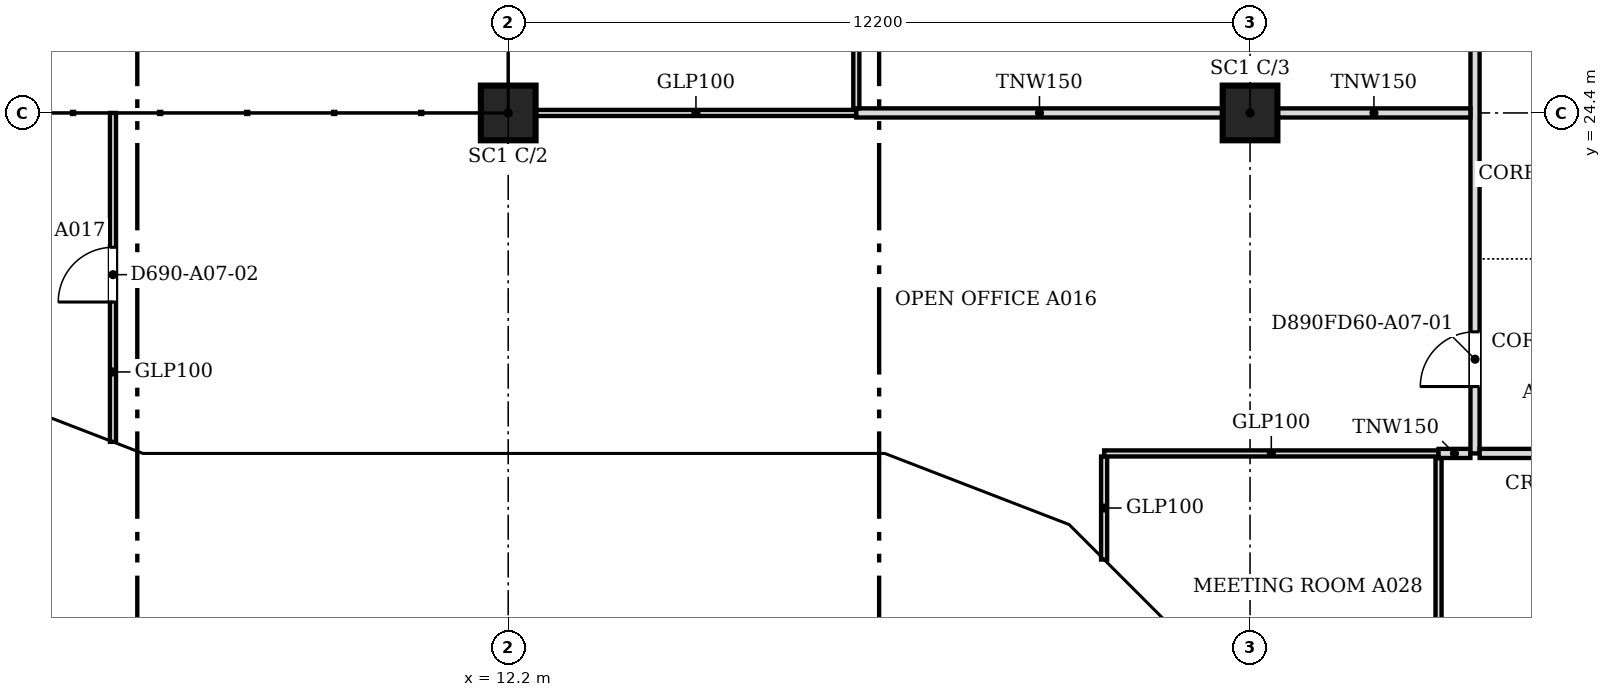
"""IFC4 building model, lengths in metres.
Left out: names, types, materials, properties, quantities, classifications, styles, units other than length and angle.
Written with IfcOpenShell. Run it as: python <this file> out.ifc"""

import sys

from ifc_helpers import new_model, si_unit, direction, frame, frame_2d, origin, origin_2d, place, context, subcontext, project, spatial, polyline, rectangle, outline, extrude, faceted_brep, source, transform, mapped, element, fill, save


model = new_model("IFC4")
c1 = context("Model", 3, precision=1e-05, world=origin(), true_north=direction((0.0, 1.0)))
c2 = subcontext(c1, "Body", "Model", "MODEL_VIEW")
j1 = project(units=[si_unit("LENGTHUNIT", "METRE"), si_unit("PLANEANGLEUNIT", "RADIAN")], contexts=[c1])
p1 = place(None, origin())
s1 = spatial("IfcSite", under=j1, at=p1, CompositionType="ELEMENT")
p2 = place(p1, origin())
s2 = spatial("IfcBuilding", under=s1, at=p2, CompositionType="ELEMENT")
p3 = place(p2, frame((0.0, 0.0, 80.0)))
s3 = spatial("IfcBuildingStorey", under=s2, at=p3, CompositionType="ELEMENT", Elevation=80.0)
for number, where, z_axis, x_axis in (
    (1, (12.2, 24.4, 0.0), (0.0, 0.0, 1.0), (1.0, 0.0, 0.0)),
    (2, (24.4, 24.4, 0.0), (0.0, 0.0, 1.0), (1.0, 0.0, 0.0)),
):
    element("IfcColumn", number, at=place(p3, frame(where, z_axis=z_axis, x_axis=x_axis)), inside=s3, PredefinedType="COLUMN", context=c2, shape_type="SweptSolid", body=[
        extrude(rectangle(XDim=0.9, YDim=0.9, at=origin_2d()), origin(), (0.0, 0.0, 1.0), 3.6),
    ])
m1 = source(origin(), c2, "Body", "Brep", [
    faceted_brep([(0.053, -0.25, 0.0), (3.003, -0.25, 3.8), (0.053, -0.25, 7.6), (0.0, -0.25, 7.532), (0.0, -0.25, 0.068), (0.106, 0.25, 7.532), (2.957, 0.25, 3.86), (2.957, 0.25, 3.74), (0.106, 0.25, 0.068), (3.003, 0.0, 3.8), (0.053, 0.0, 0.0), (0.053, 0.0, 7.6)], [[[0, 1, 2, 3, 4]], [[5, 6, 7, 8]], [[8, 7, 9, 1, 0, 10]], [[6, 5, 11, 2, 1, 9]], [[3, 2, 11]], [[10, 0, 4]], [[8, 10, 4, 3, 11, 5]], [[9, 7, 6]]]),
])
p4 = place(p3, frame((3.344, 19.631, -3.8), z_axis=(0.0, 0.0, 1.0), x_axis=(0.933007896601, -0.359855894603, 0.0)))
e3 = element("IfcWall", 3, at=p4, inside=s3, PredefinedType="SOLIDWALL", context=c2, shape_type="MappedRepresentation", body=[
    mapped(m1, transform((0.0, 0.0, 0.0), scale=1.0)),
])
m2 = source(origin(), c2, "Body", "SweptSolid", [
    extrude(outline(polyline([(0.253, 0.665), (2.687, 3.8), (0.253, 6.935), (0.253, 0.665)])), frame((0.0, 0.26, 0.0), z_axis=(0.0, -1.0, 0.0), x_axis=(1.0, 0.0, 0.0)), (0.0, 0.0, 1.0), 0.52),
])
p5 = place(p4, origin())
e4 = element("IfcOpeningElement", 4, at=p5, cuts=e3, PredefinedType="OPENING", context=c2, shape_type="MappedRepresentation", body=[
    mapped(m2, transform((0.0, 0.0, 0.0), scale=1.0)),
])
m3 = source(origin(), c2, "Body", "Brep", [
    faceted_brep([(3.003, -0.25, 0.0), (6.053, -0.25, 3.8), (3.003, -0.25, 7.6), (0.0, -0.25, 3.8), (0.047, 0.25, 3.859), (3.003, 0.25, 7.6), (6.053, 0.25, 3.8), (3.003, 0.25, 0.0), (0.047, 0.25, 3.741), (0.0, 0.0, 3.8)], [[[0, 1, 2, 3]], [[4, 5, 6, 7, 8]], [[7, 6, 1, 0]], [[6, 5, 2, 1]], [[5, 4, 9, 3, 2]], [[8, 7, 0, 3, 9]], [[8, 9, 4]]]),
])
p6 = place(p3, frame((6.146, 18.55, -3.8), z_axis=(0.0, 0.0, 1.0), x_axis=(1.0, 0.0, 0.0)))
e5 = element("IfcWall", 5, at=p6, inside=s3, PredefinedType="SOLIDWALL", context=c2, shape_type="MappedRepresentation", body=[
    mapped(m3, transform((0.0, 0.0, 0.0), scale=1.0)),
])
m4 = source(origin(), c2, "Body", "SweptSolid", [
    extrude(outline(polyline([(3.005, 0.401), (5.733, 3.8), (3.005, 7.199), (0.319, 3.8), (3.005, 0.401)])), frame((0.0, 0.26, 0.0), z_axis=(0.0, -1.0, 0.0), x_axis=(1.0, 0.0, 0.0)), (0.0, 0.0, 1.0), 0.52),
])
p7 = place(p6, origin())
e6 = element("IfcOpeningElement", 6, at=p7, cuts=e5, PredefinedType="OPENING", context=c2, shape_type="MappedRepresentation", body=[
    mapped(m4, transform((0.0, 0.0, 0.0), scale=1.0)),
])
m5 = source(origin(), c2, "Body", "Brep", [
    faceted_brep([(3.05, -0.25, 0.0), (6.1, -0.25, 3.743), (6.1, -0.25, 3.857), (3.05, -0.25, 7.6), (0.0, -0.25, 3.8), (0.0, 0.25, 3.8), (3.05, 0.25, 7.6), (6.146, 0.25, 3.8), (3.05, 0.25, 0.0), (6.146, -0.0, 3.8)], [[[0, 1, 2, 3, 4]], [[5, 6, 7, 8]], [[8, 7, 9, 1, 0]], [[7, 6, 3, 2, 9]], [[6, 5, 4, 3]], [[5, 8, 0, 4]], [[1, 9, 2]]]),
])
p8 = place(p3, frame((12.2, 18.55, -3.8), z_axis=(0.0, 0.0, 1.0), x_axis=(1.0, 0.0, 0.0)))
e7 = element("IfcWall", 7, at=p8, inside=s3, PredefinedType="SOLIDWALL", context=c2, shape_type="MappedRepresentation", body=[
    mapped(m5, transform((0.0, 0.0, 0.0), scale=1.0)),
])
m6 = source(origin(), c2, "Body", "SweptSolid", [
    extrude(outline(polyline([(3.052, 0.398), (5.824, 3.8), (3.052, 7.202), (0.321, 3.8), (3.052, 0.398)])), frame((0.0, 0.26, 0.0), z_axis=(0.0, -1.0, 0.0), x_axis=(1.0, 0.0, 0.0)), (0.0, 0.0, 1.0), 0.52),
])
p9 = place(p8, origin())
e8 = element("IfcOpeningElement", 8, at=p9, cuts=e7, PredefinedType="OPENING", context=c2, shape_type="MappedRepresentation", body=[
    mapped(m6, transform((0.0, 0.0, 0.0), scale=1.0)),
])
m7 = source(origin(), c2, "Body", "Brep", [
    faceted_brep([(3.096, -0.25, 7.536), (0.047, -0.25, 3.856), (0.047, -0.25, 3.744), (3.096, -0.25, 0.064), (0.0, 0.25, 3.8), (3.149, 0.25, 7.6), (3.202, 0.25, 7.536), (3.202, 0.25, 0.064), (3.149, 0.25, 0.0), (3.149, -0.0, 0.0), (3.149, -0.0, 7.6), (0.0, 0.0, 3.8)], [[[0, 1, 2, 3]], [[4, 5, 6, 7, 8]], [[8, 7, 9]], [[6, 5, 10]], [[5, 4, 11, 1, 0, 10]], [[4, 8, 9, 3, 2, 11]], [[11, 2, 1]], [[3, 9, 7, 6, 10, 0]]]),
])
p10 = place(p3, frame((18.346, 18.55, -3.8), z_axis=(0.0, 0.0, 1.0), x_axis=(0.932985567668, -0.359913782069, 0.0)))
e9 = element("IfcWall", 9, at=p10, inside=s3, PredefinedType="SOLIDWALL", context=c2, shape_type="MappedRepresentation", body=[
    mapped(m7, transform((0.0, 0.0, 0.0), scale=1.0)),
])
m8 = source(origin(), c2, "Body", "SweptSolid", [
    extrude(outline(polyline([(2.949, 6.967), (0.325, 3.8), (2.949, 0.633), (2.949, 6.967)])), frame((0.0, 0.26, 0.0), z_axis=(0.0, -1.0, 0.0), x_axis=(1.0, 0.0, 0.0)), (0.0, 0.0, 1.0), 0.52),
])
p11 = place(p10, origin())
e10 = element("IfcOpeningElement", 10, at=p11, cuts=e9, PredefinedType="OPENING", context=c2, shape_type="MappedRepresentation", body=[
    mapped(m8, transform((0.0, 0.0, 0.0), scale=1.0)),
])
m9 = source(origin(), c2, "Body", "Brep", [
    faceted_brep([(0.106, -0.25, 0.064), (3.156, -0.25, 3.736), (3.156, -0.25, 3.864), (0.106, -0.25, 7.536), (0.0, 0.25, 7.536), (0.053, 0.25, 7.6), (3.209, 0.25, 3.8), (0.053, 0.25, 0.0), (0.0, 0.25, 0.064), (3.209, -0.0, 3.8), (0.053, 0.0, 0.0), (0.053, 0.0, 7.6)], [[[0, 1, 2, 3]], [[4, 5, 6, 7, 8]], [[7, 6, 9, 1, 0, 10]], [[6, 5, 11, 3, 2, 9]], [[5, 4, 11]], [[8, 7, 10]], [[8, 10, 0, 3, 11, 4]], [[1, 9, 2]]]),
])
p12 = place(p3, frame((21.248, 17.454, -3.8), z_axis=(0.0, 0.0, 1.0), x_axis=(0.707106781187, -0.707106781187, 0.0)))
e11 = element("IfcWall", 11, at=p12, inside=s3, PredefinedType="SOLIDWALL", context=c2, shape_type="MappedRepresentation", body=[
    mapped(m9, transform((0.0, 0.0, 0.0), scale=1.0)),
])
m10 = source(origin(), c2, "Body", "SweptSolid", [
    extrude(outline(polyline([(0.253, 0.632), (2.884, 3.8), (0.253, 6.968), (0.253, 0.632)])), frame((0.0, 0.26, 0.0), z_axis=(0.0, -1.0, 0.0), x_axis=(1.0, 0.0, 0.0)), (0.0, 0.0, 1.0), 0.52),
])
p13 = place(p12, origin())
e12 = element("IfcOpeningElement", 12, at=p13, cuts=e11, PredefinedType="OPENING", context=c2, shape_type="MappedRepresentation", body=[
    mapped(m10, transform((0.0, 0.0, 0.0), scale=1.0)),
])
p14 = place(p2, frame((0.0, 0.0, 83.8)))
s4 = spatial("IfcBuildingStorey", under=s2, at=p14, CompositionType="ELEMENT", Elevation=83.8)
m11 = source(origin(), c2, "Body", "Brep", [
    faceted_brep([(2.95, -0.25, 0.0), (2.997, -0.25, 0.059), (2.997, -0.25, 7.541), (2.95, -0.25, 7.6), (0.0, -0.25, 3.8), (0.053, 0.25, 3.868), (2.904, 0.25, 7.54), (2.904, 0.25, 0.06), (0.053, 0.25, 3.732), (2.95, 0.0, 0.0), (2.95, 0.0, 7.6), (0.0, 0.0, 3.8)], [[[0, 1, 2, 3, 4]], [[5, 6, 7, 8]], [[1, 0, 9]], [[10, 3, 2]], [[6, 5, 11, 4, 3, 10]], [[8, 7, 9, 0, 4, 11]], [[8, 11, 5]], [[1, 9, 7, 6, 10, 2]]]),
])
p15 = place(p14, frame((3.394, 19.612, -3.8), z_axis=(0.0, 0.0, 1.0), x_axis=(0.932990326376, -0.359901446078, 0.0)))
e13 = element("IfcWall", 13, at=p15, inside=s4, PredefinedType="SOLIDWALL", context=c2, shape_type="MappedRepresentation", body=[
    mapped(m11, transform((0.0, 0.0, 0.0), scale=1.0)),
])
m12 = source(origin(), c2, "Body", "SweptSolid", [
    extrude(outline(polyline([(2.75, 6.935), (0.316, 3.8), (2.75, 0.665), (2.75, 6.935)])), frame((0.0, 0.26, 0.0), z_axis=(0.0, -1.0, 0.0), x_axis=(1.0, 0.0, 0.0)), (0.0, 0.0, 1.0), 0.52),
])
p16 = place(p15, origin())
e14 = element("IfcOpeningElement", 14, at=p16, cuts=e13, PredefinedType="OPENING", context=c2, shape_type="MappedRepresentation", body=[
    mapped(m12, transform((0.0, 0.0, 0.0), scale=1.0)),
])
m13 = source(origin(), c2, "Body", "Brep", [
    faceted_brep([(0.047, -0.25, 0.0), (3.05, -0.25, 3.8), (0.047, -0.25, 7.6), (0.0, -0.25, 7.54), (0.0, -0.25, 0.06), (0.093, 0.25, 7.541), (3.05, 0.25, 3.8), (0.093, 0.25, 0.059), (0.047, 0.0, 0.0), (0.047, 0.0, 7.6)], [[[0, 1, 2, 3, 4]], [[5, 6, 7]], [[7, 6, 1, 0, 8]], [[6, 5, 9, 2, 1]], [[3, 2, 9]], [[8, 0, 4]], [[7, 8, 4, 3, 9, 5]]]),
])
p17 = place(p14, frame((6.1, 18.55, -3.8), z_axis=(0.0, 0.0, 1.0), x_axis=(1.0, 0.0, 0.0)))
e15 = element("IfcWall", 15, at=p17, inside=s4, PredefinedType="SOLIDWALL", context=c2, shape_type="MappedRepresentation", body=[
    mapped(m13, transform((0.0, 0.0, 0.0), scale=1.0)),
])
m14 = source(origin(), c2, "Body", "SweptSolid", [
    extrude(outline(polyline([(0.247, 0.656), (2.731, 3.8), (0.247, 6.944), (0.247, 0.656)])), frame((0.0, 0.26, 0.0), z_axis=(0.0, -1.0, 0.0), x_axis=(1.0, 0.0, 0.0)), (0.0, 0.0, 1.0), 0.52),
])
p18 = place(p17, origin())
e16 = element("IfcOpeningElement", 16, at=p18, cuts=e15, PredefinedType="OPENING", context=c2, shape_type="MappedRepresentation", body=[
    mapped(m14, transform((0.0, 0.0, 0.0), scale=1.0)),
])
m15 = source(origin(), c2, "Body", "SweptSolid", [
    extrude(outline(polyline([(3.05, 0.0), (6.1, 3.8), (3.05, 7.6), (0.0, 3.8), (3.05, 0.0)])), frame((0.0, 0.25, 0.0), z_axis=(0.0, -1.0, 0.0), x_axis=(1.0, 0.0, 0.0)), (0.0, 0.0, 1.0), 0.5),
])
p19 = place(p14, frame((9.15, 18.55, -3.8), z_axis=(0.0, 0.0, 1.0), x_axis=(1.0, 0.0, 0.0)))
e17 = element("IfcWall", 17, at=p19, inside=s4, PredefinedType="SOLIDWALL", context=c2, shape_type="MappedRepresentation", body=[
    mapped(m15, transform((0.0, 0.0, 0.0), scale=1.0)),
])
m16 = source(origin(), c2, "Body", "SweptSolid", [
    extrude(outline(polyline([(3.05, 0.399), (5.78, 3.8), (3.05, 7.201), (0.321, 3.8), (3.05, 0.399)])), frame((0.0, 0.26, 0.0), z_axis=(0.0, -1.0, 0.0), x_axis=(1.0, 0.0, 0.0)), (0.0, 0.0, 1.0), 0.52),
])
p20 = place(p19, origin())
e18 = element("IfcOpeningElement", 18, at=p20, cuts=e17, PredefinedType="OPENING", context=c2, shape_type="MappedRepresentation", body=[
    mapped(m16, transform((0.0, 0.0, 0.0), scale=1.0)),
])
m17 = source(origin(), c2, "Body", "Brep", [
    faceted_brep([(3.05, -0.25, 7.543), (0.0, -0.25, 3.8), (3.05, -0.25, 0.057), (0.0, 0.25, 3.8), (3.096, 0.25, 7.6), (3.143, 0.25, 7.544), (3.143, 0.25, 0.056), (3.096, 0.25, 0.0), (3.096, -0.0, 0.0), (3.096, -0.0, 7.6)], [[[0, 1, 2]], [[3, 4, 5, 6, 7]], [[7, 6, 8]], [[5, 4, 9]], [[4, 3, 1, 0, 9]], [[3, 7, 8, 2, 1]], [[2, 8, 6, 5, 9, 0]]]),
])
p21 = place(p14, frame((15.25, 18.55, -3.8), z_axis=(0.0, 0.0, 1.0), x_axis=(1.0, 0.0, 0.0)))
e19 = element("IfcWall", 19, at=p21, inside=s4, PredefinedType="SOLIDWALL", context=c2, shape_type="MappedRepresentation", body=[
    mapped(m17, transform((0.0, 0.0, 0.0), scale=1.0)),
])
m18 = source(origin(), c2, "Body", "SweptSolid", [
    extrude(outline(polyline([(2.896, 6.959), (0.323, 3.8), (2.896, 0.641), (2.896, 6.959)])), frame((0.0, 0.26, 0.0), z_axis=(0.0, -1.0, 0.0), x_axis=(1.0, 0.0, 0.0)), (0.0, 0.0, 1.0), 0.52),
])
p22 = place(p21, origin())
e20 = element("IfcOpeningElement", 20, at=p22, cuts=e19, PredefinedType="OPENING", context=c2, shape_type="MappedRepresentation", body=[
    mapped(m18, transform((0.0, 0.0, 0.0), scale=1.0)),
])
m19 = source(origin(), c2, "Body", "Brep", [
    faceted_brep([(0.093, -0.25, 0.056), (3.143, -0.25, 3.736), (3.143, -0.25, 3.864), (0.093, -0.25, 7.544), (0.0, 0.25, 7.543), (0.047, 0.25, 7.6), (3.196, 0.25, 3.8), (0.047, 0.25, 0.0), (0.0, 0.25, 0.057), (3.196, -0.0, 3.8), (0.047, 0.0, 0.0), (0.047, 0.0, 7.6)], [[[0, 1, 2, 3]], [[4, 5, 6, 7, 8]], [[7, 6, 9, 1, 0, 10]], [[6, 5, 11, 3, 2, 9]], [[5, 4, 11]], [[8, 7, 10]], [[8, 10, 0, 3, 11, 4]], [[1, 9, 2]]]),
])
p23 = place(p14, frame((18.303, 18.567, -3.8), z_axis=(0.0, 0.0, 1.0), x_axis=(0.932978940178, -0.359930961693, 0.0)))
e21 = element("IfcWall", 21, at=p23, inside=s4, PredefinedType="SOLIDWALL", context=c2, shape_type="MappedRepresentation", body=[
    mapped(m19, transform((0.0, 0.0, 0.0), scale=1.0)),
])
m20 = source(origin(), c2, "Body", "SweptSolid", [
    extrude(outline(polyline([(0.247, 0.633), (2.871, 3.8), (0.247, 6.967), (0.247, 0.633)])), frame((0.0, 0.26, 0.0), z_axis=(0.0, -1.0, 0.0), x_axis=(1.0, 0.0, 0.0)), (0.0, 0.0, 1.0), 0.52),
])
p24 = place(p23, origin())
e22 = element("IfcOpeningElement", 22, at=p24, cuts=e21, PredefinedType="OPENING", context=c2, shape_type="MappedRepresentation", body=[
    mapped(m20, transform((0.0, 0.0, 0.0), scale=1.0)),
])
m21 = source(origin(), c2, "Body", "Brep", [
    faceted_brep([(3.103, -0.25, 7.536), (0.053, -0.25, 3.864), (0.053, -0.25, 3.736), (3.103, -0.25, 0.064), (0.0, 0.25, 3.8), (3.156, 0.25, 7.6), (3.209, 0.25, 7.536), (3.209, 0.25, 0.064), (3.156, 0.25, 0.0), (3.156, -0.0, 0.0), (3.156, -0.0, 7.6), (0.0, 0.0, 3.8)], [[[0, 1, 2, 3]], [[4, 5, 6, 7, 8]], [[8, 7, 9]], [[6, 5, 10]], [[5, 4, 11, 1, 0, 10]], [[4, 8, 9, 3, 2, 11]], [[11, 2, 1]], [[3, 9, 7, 6, 10, 0]]]),
])
p25 = place(p14, frame((21.285, 17.417, -3.8), z_axis=(0.0, 0.0, 1.0), x_axis=(0.707106781187, -0.707106781187, 0.0)))
e23 = element("IfcWall", 23, at=p25, inside=s4, PredefinedType="SOLIDWALL", context=c2, shape_type="MappedRepresentation", body=[
    mapped(m21, transform((0.0, 0.0, 0.0), scale=1.0)),
])
m22 = source(origin(), c2, "Body", "SweptSolid", [
    extrude(outline(polyline([(2.956, 6.968), (0.325, 3.8), (2.956, 0.632), (2.956, 6.968)])), frame((0.0, 0.26, 0.0), z_axis=(0.0, -1.0, 0.0), x_axis=(1.0, 0.0, 0.0)), (0.0, 0.0, 1.0), 0.52),
])
p26 = place(p25, origin())
e24 = element("IfcOpeningElement", 24, at=p26, cuts=e23, PredefinedType="OPENING", context=c2, shape_type="MappedRepresentation", body=[
    mapped(m22, transform((0.0, 0.0, 0.0), scale=1.0)),
])
p27 = place(p3, frame((27.5, 10.276, 0.0), z_axis=(0.0, 0.0, 1.0), x_axis=(0.0, 1.0, 0.0)))
e25 = element("IfcWall", 25, at=p27, inside=s3, PredefinedType="PARTITIONING", context=c2, shape_type="SweptSolid", body=[
    extrude(rectangle(XDim=8.448, YDim=0.1, at=frame_2d((4.224, 0.0))), origin(), (0.0, 0.0, 1.0), 3.067),
])
m23 = source(origin(), c2, "Body", "SweptSolid", [
    extrude(rectangle(XDim=0.9, YDim=2.1, at=frame_2d((0.45, 1.05))), frame((0.0, 0.06, 0.0), z_axis=(0.0, -1.0, 0.0), x_axis=(1.0, 0.0, 0.0)), (0.0, 0.0, 1.0), 0.12),
])
p28 = place(p27, frame((3.8, 0.0, 0.0)))
e26 = element("IfcOpeningElement", 26, at=p28, cuts=e25, PredefinedType="OPENING", context=c2, shape_type="MappedRepresentation", body=[
    mapped(m23, transform((0.0, 0.0, 0.0), scale=1.0)),
])
p29 = place(p3, frame((22.0, 17.055, 0.0), z_axis=(0.0, 0.0, 1.0), x_axis=(0.0, 1.0, 0.0)))
e27 = element("IfcWall", 27, at=p29, inside=s3, PredefinedType="PARTITIONING", context=c2, shape_type="SweptSolid", body=[
    extrude(rectangle(XDim=1.694, YDim=0.1, at=frame_2d((0.847, 0.0))), origin(), (0.0, 0.0, 1.0), 3.067),
])
p30 = place(p3, frame((22.0, 18.8, 0.0), z_axis=(0.0, 0.0, 1.0), x_axis=(1.0, 0.0, 0.0)))
e28 = element("IfcWall", 28, at=p30, inside=s3, PredefinedType="PARTITIONING", context=c2, shape_type="SweptSolid", body=[
    extrude(rectangle(XDim=5.499, YDim=0.1, at=frame_2d((2.75, 0.0))), origin(), (0.0, 0.0, 1.0), 3.067),
])
p31 = place(p3, frame((27.5, 18.8, 0.0), z_axis=(0.0, 0.0, 1.0), x_axis=(1.0, 0.0, 0.0)))
e29 = element("IfcWall", 29, at=p31, inside=s3, PredefinedType="PARTITIONING", context=c2, shape_type="SweptSolid", body=[
    extrude(rectangle(XDim=0.524, YDim=0.15, at=frame_2d((0.262, 0.0))), origin(), (0.0, 0.0, 1.0), 3.067),
])
p32 = place(p3, frame((28.1, 18.8, 0.0), z_axis=(0.0, 0.0, 1.0), x_axis=(0.0, 1.0, 0.0)))
e30 = element("IfcWall", 30, at=p32, inside=s3, PredefinedType="PARTITIONING", context=c2, shape_type="SweptSolid", body=[
    extrude(rectangle(XDim=26.024, YDim=0.15, at=frame_2d((13.012, 0.0))), origin(), (0.0, 0.0, 1.0), 3.067),
])
m24 = source(origin(), c2, "Body", "SweptSolid", [
    extrude(rectangle(XDim=0.9, YDim=2.1, at=frame_2d((0.45, 1.05))), frame((0.0, 0.085, 0.0), z_axis=(0.0, -1.0, 0.0), x_axis=(1.0, 0.0, 0.0)), (0.0, 0.0, 1.0), 0.17),
])
p33 = place(p32, frame((1.1, 0.0, 0.0)))
e31 = element("IfcOpeningElement", 31, at=p33, cuts=e30, PredefinedType="OPENING", context=c2, shape_type="MappedRepresentation", body=[
    mapped(m24, transform((0.0, 0.0, 0.0), scale=1.0)),
])
m25 = source(origin(), c2, "Body", "SweptSolid", [
    extrude(rectangle(XDim=1.0, YDim=2.1, at=frame_2d((0.5, 1.05))), frame((0.0, 0.085, 0.0), z_axis=(0.0, -1.0, 0.0), x_axis=(1.0, 0.0, 0.0)), (0.0, 0.0, 1.0), 0.17),
])
p34 = place(p32, frame((22.951, 0.0, 0.0)))
e32 = element("IfcOpeningElement", 32, at=p34, cuts=e30, PredefinedType="OPENING", context=c2, shape_type="MappedRepresentation", body=[
    mapped(m25, transform((0.0, 0.0, 0.0), scale=1.0)),
])
p35 = place(p32, frame((8.2, 0.0, 0.0)))
e33 = element("IfcOpeningElement", 33, at=p35, cuts=e30, PredefinedType="OPENING", context=c2, shape_type="MappedRepresentation", body=[
    mapped(m24, transform((0.0, 0.0, 0.0), scale=1.0)),
])
p36 = place(p32, frame((15.8, 0.0, 0.0)))
e34 = element("IfcOpeningElement", 34, at=p36, cuts=e30, PredefinedType="OPENING", context=c2, shape_type="MappedRepresentation", body=[
    mapped(m25, transform((0.0, 0.0, 0.0), scale=1.0)),
])
p37 = place(p3, frame((28.176, 18.8, 0.0), z_axis=(0.0, 0.0, 1.0), x_axis=(1.0, 0.0, 0.0)))
e35 = element("IfcWall", 35, at=p37, inside=s3, PredefinedType="PARTITIONING", context=c2, shape_type="SweptSolid", body=[
    extrude(rectangle(XDim=2.248, YDim=0.15, at=frame_2d((1.124, 0.0))), origin(), (0.0, 0.0, 1.0), 3.067),
])
p38 = place(p3, frame((5.7, 18.99, 0.0), z_axis=(0.0, 0.0, 1.0), x_axis=(0.0, 1.0, 0.0)))
e36 = element("IfcWall", 36, at=p38, inside=s3, PredefinedType="PARTITIONING", context=c2, shape_type="SweptSolid", body=[
    extrude(rectangle(XDim=5.41, YDim=0.1, at=frame_2d((2.705, 0.0))), origin(), (0.0, 0.0, 1.0), 3.067),
])
p39 = place(p38, frame((2.3, 0.0, 0.0)))
e37 = element("IfcOpeningElement", 37, at=p39, cuts=e36, PredefinedType="OPENING", context=c2, shape_type="MappedRepresentation", body=[
    mapped(m23, transform((0.0, 0.0, 0.0), scale=1.0)),
])
p40 = place(p3, frame((12.651, 24.4, 0.0), z_axis=(0.0, 0.0, 1.0), x_axis=(1.0, 0.0, 0.0)))
e38 = element("IfcWall", 38, at=p40, inside=s3, PredefinedType="PARTITIONING", context=c2, shape_type="SweptSolid", body=[
    extrude(rectangle(XDim=5.273, YDim=0.1, at=frame_2d((2.637, 0.0))), origin(), (0.0, 0.0, 1.0), 3.067),
])
p41 = place(p3, frame((17.925, 24.4, 0.0), z_axis=(0.0, 0.0, 1.0), x_axis=(1.0, 0.0, 0.0)))
e39 = element("IfcWall", 39, at=p41, inside=s3, PredefinedType="PARTITIONING", context=c2, shape_type="SweptSolid", body=[
    extrude(rectangle(XDim=6.024, YDim=0.15, at=frame_2d((3.012, 0.0))), origin(), (0.0, 0.0, 1.0), 3.067),
])
p42 = place(p3, frame((24.851, 24.4, 0.0), z_axis=(0.0, 0.0, 1.0), x_axis=(1.0, 0.0, 0.0)))
e40 = element("IfcWall", 40, at=p42, inside=s3, PredefinedType="PARTITIONING", context=c2, shape_type="SweptSolid", body=[
    extrude(rectangle(XDim=3.173, YDim=0.15, at=frame_2d((1.586, 0.0))), origin(), (0.0, 0.0, 1.0), 3.067),
])
p43 = place(p3, frame((17.925, 24.476, 0.0), z_axis=(0.0, 0.0, 1.0), x_axis=(0.0, 1.0, 0.0)))
e41 = element("IfcWall", 41, at=p43, inside=s3, PredefinedType="PARTITIONING", context=c2, shape_type="SweptSolid", body=[
    extrude(rectangle(XDim=5.948, YDim=0.1, at=frame_2d((2.974, 0.0))), origin(), (0.0, 0.0, 1.0), 3.067),
])
p44 = place(p43, frame((2.5, 0.0, 0.0)))
e42 = element("IfcOpeningElement", 42, at=p44, cuts=e41, PredefinedType="OPENING", context=c2, shape_type="MappedRepresentation", body=[
    mapped(m23, transform((0.0, 0.0, 0.0), scale=1.0)),
])
m26 = source(origin(), c2, "Body", "SweptSolid", [
    extrude(rectangle(XDim=0.9, YDim=2.1, at=frame_2d((0.45, 1.05))), frame((0.0, 0.025, 0.0), z_axis=(0.0, -1.0, 0.0), x_axis=(1.0, 0.0, 0.0)), (0.0, 0.0, 1.0), 0.05),
])
p45 = place(p33, origin())
e43 = element("IfcDoor", 43, at=p45, inside=s3, OperationType="SINGLE_SWING_LEFT", PredefinedType="DOOR", context=c2, shape_type="MappedRepresentation", body=[
    mapped(m26, transform((0.0, 0.0, 0.0), scale=1.0)),
])
fill(e31, e43)
p46 = place(p39, origin())
e44 = element("IfcDoor", 44, at=p46, inside=s3, OperationType="SINGLE_SWING_LEFT", PredefinedType="DOOR", context=c2, shape_type="MappedRepresentation", body=[
    mapped(m26, transform((0.0, 0.0, 0.0), scale=1.0)),
])
fill(e37, e44)
save(model, sys.argv[1])
